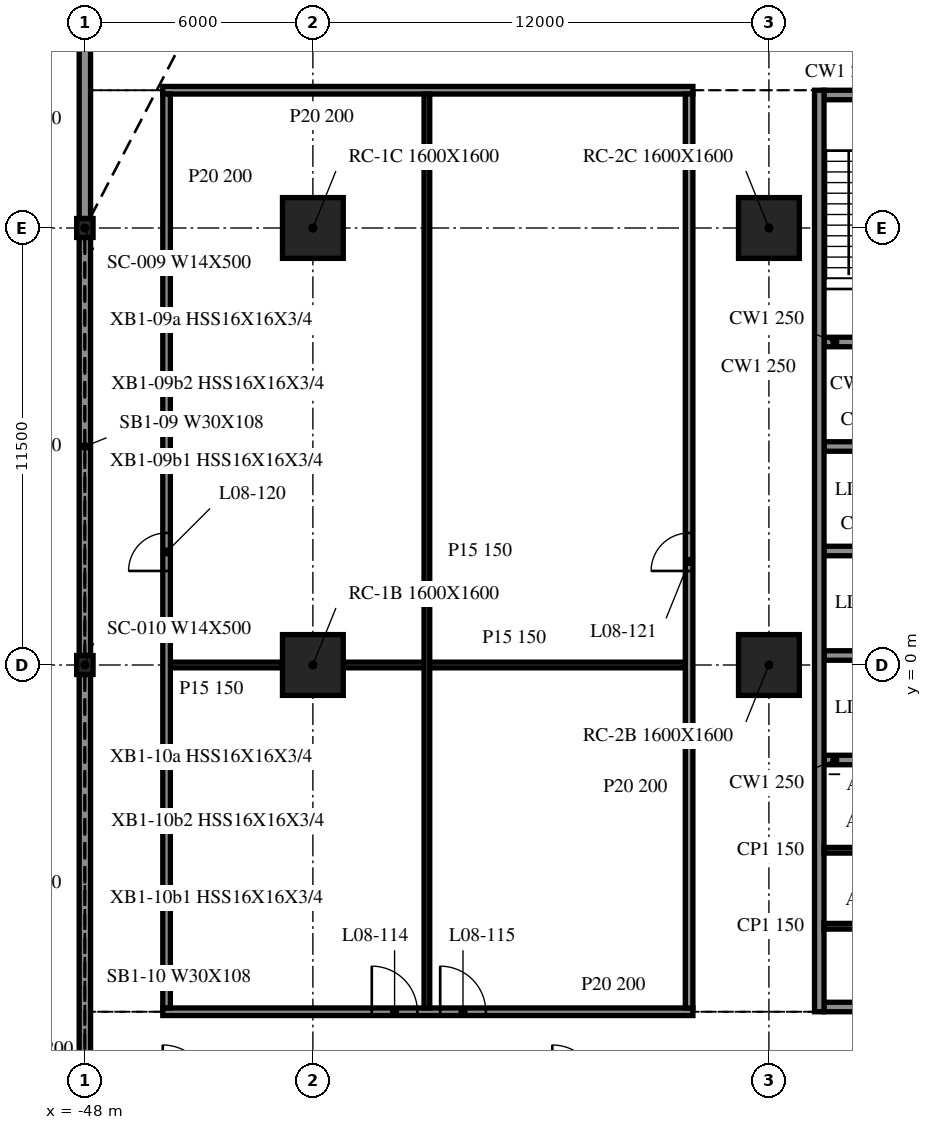
"""IFC4 building model, lengths in metres.
Left out: names, types, materials, properties, quantities, classifications, styles, units other than length and angle.
Written with IfcOpenShell. Run it as: python <this file> out.ifc"""

import sys

from ifc_helpers import new_model, si_unit, direction, frame, frame_2d, origin, origin_2d, place, context, subcontext, project, spatial, rectangle, i_section, extrude, element, fill, save


model = new_model("IFC4")
c1 = context("Model", 3, precision=1e-05, world=origin(), true_north=direction((0.0, 1.0)))
c2 = subcontext(c1, "Body", "Model", "MODEL_VIEW")
j1 = project(units=[si_unit("LENGTHUNIT", "METRE"), si_unit("PLANEANGLEUNIT", "RADIAN")], contexts=[c1])
p1 = place(None, origin())
s1 = spatial("IfcSite", under=j1, at=p1, CompositionType="ELEMENT")
p2 = place(p1, origin())
s2 = spatial("IfcBuilding", under=s1, at=p2, CompositionType="ELEMENT")
p3 = place(p2, frame((0.0, 0.0, 37.3)))
s3 = spatial("IfcBuildingStorey", under=s2, at=p3, CompositionType="ELEMENT", Elevation=37.3)
for number, where, z_axis, x_axis in (
    (1, (-42.0, 0.0, -0.34), (0.0, 0.0, 1.0), (1.0, 0.0, 0.0)),
    (2, (-42.0, 11.5, -0.34), (0.0, 0.0, 1.0), (1.0, 0.0, 0.0)),
    (3, (-30.0, 0.0, -0.34), (0.0, 0.0, 1.0), (1.0, 0.0, 0.0)),
    (4, (-30.0, 11.5, -0.34), (0.0, 0.0, 1.0), (1.0, 0.0, 0.0)),
):
    element("IfcColumn", number, at=place(p3, frame(where, z_axis=z_axis, x_axis=x_axis)), inside=s3, PredefinedType="COLUMN", context=c2, shape_type="SweptSolid", body=[
        extrude(rectangle(XDim=1.6, YDim=1.6, at=origin_2d()), origin(), (0.0, 0.0, 1.0), 4.09),
    ])
for number, where, z_axis, x_axis in (
    (5, (-48.0, 11.5, -0.34), (0.0, 0.0, 1.0), (1.0, 0.0, 0.0)),
    (6, (-48.0, 0.0, -0.34), (0.0, 0.0, 1.0), (1.0, 0.0, 0.0)),
):
    element("IfcColumn", number, at=place(p3, frame(where, z_axis=z_axis, x_axis=x_axis)), inside=s3, PredefinedType="COLUMN", context=c2, shape_type="SweptSolid", body=[
        extrude(i_section(OverallWidth=0.432, OverallDepth=0.498, WebThickness=0.056, FlangeThickness=0.089, at=origin_2d()), origin(), (0.0, 0.0, 1.0), 4.09),
    ])
p4 = place(p3, frame((-48.0, 17.0, 0.0), z_axis=(0.0, 0.0, 1.0), x_axis=(0.0, -1.0, 0.0)))
e7 = element("IfcWall", 7, at=p4, inside=s3, PredefinedType="NOTDEFINED", context=c2, shape_type="SweptSolid", body=[
    extrude(rectangle(XDim=5.251, YDim=0.3, at=frame_2d((2.625, 0.0))), origin(), (0.0, 0.0, 1.0), 3.75),
])
for number, where, z_axis, x_axis in (
    (8, (-48.0, 11.251, 0.0), (0.0, 0.0, 1.0), (0.0, -1.0, 0.0)),
    (9, (-48.0, -0.249, 0.0), (0.0, 0.0, 1.0), (0.0, -1.0, 0.0)),
):
    element("IfcWall", number, at=place(p3, frame(where, z_axis=z_axis, x_axis=x_axis)), inside=s3, PredefinedType="NOTDEFINED", context=c2, shape_type="SweptSolid", body=[
        extrude(rectangle(XDim=11.002, YDim=0.3, at=frame_2d((5.501, 0.0))), origin(), (0.0, 0.0, 1.0), 3.75),
    ])
p5 = place(p3, frame((-28.675, 15.125, 0.0), z_axis=(0.0, 0.0, 1.0), x_axis=(0.0, -1.0, 0.0)))
e10 = element("IfcWall", 10, at=p5, inside=s3, PredefinedType="SOLIDWALL", context=c2, shape_type="SweptSolid", body=[
    extrude(rectangle(XDim=24.25, YDim=0.25, at=frame_2d((12.125, 0.0))), origin(), (0.0, 0.0, 1.0), 3.75),
])
p6 = place(p3, frame((-19.45, -9.0, 0.0), z_axis=(0.0, 0.0, 1.0), x_axis=(-1.0, 0.0, 0.0)))
e11 = element("IfcWall", 11, at=p6, inside=s3, PredefinedType="SOLIDWALL", context=c2, shape_type="SweptSolid", body=[
    extrude(rectangle(XDim=9.1, YDim=0.25, at=frame_2d((4.55, 0.0))), origin(), (0.0, 0.0, 1.0), 3.75),
])
p7 = place(p6, frame((3.65, 0.0, 0.0)))
e12 = element("IfcOpeningElement", 12, at=p7, cuts=e11, PredefinedType="OPENING", context=c2, shape_type="SweptSolid", body=[
    extrude(rectangle(XDim=1.8, YDim=2.1, at=frame_2d((0.9, 1.05))), frame((0.0, 0.135, 0.0), z_axis=(0.0, -1.0, 0.0), x_axis=(1.0, 0.0, 0.0)), (0.0, 0.0, 1.0), 0.27),
])
p8 = place(p3, frame((-28.55, 15.0, 0.0), z_axis=(0.0, 0.0, 1.0), x_axis=(1.0, 0.0, 0.0)))
e13 = element("IfcWall", 13, at=p8, inside=s3, PredefinedType="SOLIDWALL", context=c2, shape_type="SweptSolid", body=[
    extrude(rectangle(XDim=9.1, YDim=0.25, at=frame_2d((4.55, 0.0))), origin(), (0.0, 0.0, 1.0), 3.75),
])
p9 = place(p8, frame((3.65, 0.0, 0.0)))
e14 = element("IfcOpeningElement", 14, at=p9, cuts=e13, PredefinedType="OPENING", context=c2, shape_type="SweptSolid", body=[
    extrude(rectangle(XDim=1.8, YDim=2.1, at=frame_2d((0.9, 1.05))), frame((0.0, 0.135, 0.0), z_axis=(0.0, -1.0, 0.0), x_axis=(1.0, 0.0, 0.0)), (0.0, 0.0, 1.0), 0.27),
])
for number, where, z_axis, x_axis in (
    (15, (-28.55, -2.5, 0.0), (0.0, 0.0, 1.0), (1.0, 0.0, 0.0)),
    (16, (-28.55, 0.25, 0.0), (0.0, 0.0, 1.0), (1.0, 0.0, 0.0)),
    (17, (-28.55, 3.0, 0.0), (0.0, 0.0, 1.0), (1.0, 0.0, 0.0)),
    (18, (-28.55, 5.75, 0.0), (0.0, 0.0, 1.0), (1.0, 0.0, 0.0)),
    (19, (-28.55, 8.5, 0.0), (0.0, 0.0, 1.0), (1.0, 0.0, 0.0)),
):
    element("IfcWall", number, at=place(p3, frame(where, z_axis=z_axis, x_axis=x_axis)), inside=s3, PredefinedType="SOLIDWALL", context=c2, shape_type="SweptSolid", body=[
        extrude(rectangle(XDim=2.85, YDim=0.25, at=frame_2d((1.425, 0.0))), origin(), (0.0, 0.0, 1.0), 3.75),
    ])
for number, where, z_axis, x_axis in (
    (20, (-28.55, -6.875, 0.0), (0.0, 0.0, 1.0), (1.0, 0.0, 0.0)),
    (21, (-28.55, -4.875, 0.0), (0.0, 0.0, 1.0), (1.0, 0.0, 0.0)),
):
    element("IfcWall", number, at=place(p3, frame(where, z_axis=z_axis, x_axis=x_axis)), inside=s3, PredefinedType="PARTITIONING", context=c2, shape_type="SweptSolid", body=[
        extrude(rectangle(XDim=2.85, YDim=0.15, at=frame_2d((1.425, 0.0))), origin(), (0.0, 0.0, 1.0), 3.75),
    ])
p10 = place(p3, frame((-45.95, -9.125, 0.0), z_axis=(0.0, 0.0, 1.0), x_axis=(1.0, 0.0, 0.0)))
e22 = element("IfcWall", 22, at=p10, inside=s3, PredefinedType="PARTITIONING", context=c2, shape_type="SweptSolid", body=[
    extrude(rectangle(XDim=13.95, YDim=0.2, at=frame_2d((6.975, 0.0))), origin(), (0.0, 0.0, 1.0), 3.75),
])
p11 = place(p10, frame((5.5, 0.0, 0.0)))
e23 = element("IfcOpeningElement", 23, at=p11, cuts=e22, PredefinedType="OPENING", context=c2, shape_type="SweptSolid", body=[
    extrude(rectangle(XDim=1.2, YDim=2.1, at=frame_2d((0.6, 1.05))), frame((0.0, 0.11, 0.0), z_axis=(0.0, -1.0, 0.0), x_axis=(1.0, 0.0, 0.0)), (0.0, 0.0, 1.0), 0.22),
])
p12 = place(p10, frame((7.3, 0.0, 0.0)))
e24 = element("IfcOpeningElement", 24, at=p12, cuts=e22, PredefinedType="OPENING", context=c2, shape_type="SweptSolid", body=[
    extrude(rectangle(XDim=1.2, YDim=2.1, at=frame_2d((0.6, 1.05))), frame((0.0, 0.11, 0.0), z_axis=(0.0, -1.0, 0.0), x_axis=(1.0, 0.0, 0.0)), (0.0, 0.0, 1.0), 0.22),
])
p13 = place(p3, frame((-45.75, 0.0, 0.0), z_axis=(0.0, 0.0, 1.0), x_axis=(1.0, 0.0, 0.0)))
e25 = element("IfcWall", 25, at=p13, inside=s3, PredefinedType="PARTITIONING", context=c2, shape_type="SweptSolid", body=[
    extrude(rectangle(XDim=2.95, YDim=0.15, at=frame_2d((1.475, 0.0))), origin(), (0.0, 0.0, 1.0), 3.75),
])
p14 = place(p3, frame((-41.2, 0.0, 0.0), z_axis=(0.0, 0.0, 1.0), x_axis=(1.0, 0.0, 0.0)))
e26 = element("IfcWall", 26, at=p14, inside=s3, PredefinedType="PARTITIONING", context=c2, shape_type="SweptSolid", body=[
    extrude(rectangle(XDim=9.0, YDim=0.15, at=frame_2d((4.5, 0.0))), origin(), (0.0, 0.0, 1.0), 3.75),
])
p15 = place(p3, frame((-45.95, 15.125, 0.0), z_axis=(0.0, 0.0, 1.0), x_axis=(1.0, 0.0, 0.0)))
e27 = element("IfcWall", 27, at=p15, inside=s3, PredefinedType="PARTITIONING", context=c2, shape_type="SweptSolid", body=[
    extrude(rectangle(XDim=13.95, YDim=0.2, at=frame_2d((6.975, 0.0))), origin(), (0.0, 0.0, 1.0), 3.75),
])
p16 = place(p3, frame((-45.85, -9.025, 0.0), z_axis=(0.0, 0.0, 1.0), x_axis=(0.0, 1.0, 0.0)))
e28 = element("IfcWall", 28, at=p16, inside=s3, PredefinedType="PARTITIONING", context=c2, shape_type="SweptSolid", body=[
    extrude(rectangle(XDim=24.05, YDim=0.2, at=frame_2d((12.025, 0.0))), origin(), (0.0, 0.0, 1.0), 3.75),
])
p17 = place(p16, frame((11.5, 0.0, 0.0)))
e29 = element("IfcOpeningElement", 29, at=p17, cuts=e28, PredefinedType="OPENING", context=c2, shape_type="SweptSolid", body=[
    extrude(rectangle(XDim=1.0, YDim=2.1, at=frame_2d((0.5, 1.05))), frame((0.0, 0.11, 0.0), z_axis=(0.0, -1.0, 0.0), x_axis=(1.0, 0.0, 0.0)), (0.0, 0.0, 1.0), 0.22),
])
p18 = place(p3, frame((-39.0, -9.025, 0.0), z_axis=(0.0, 0.0, 1.0), x_axis=(0.0, 1.0, 0.0)))
e30 = element("IfcWall", 30, at=p18, inside=s3, PredefinedType="PARTITIONING", context=c2, shape_type="SweptSolid", body=[
    extrude(rectangle(XDim=24.05, YDim=0.15, at=frame_2d((12.025, 0.0))), origin(), (0.0, 0.0, 1.0), 3.75),
])
p19 = place(p3, frame((-32.1, -9.025, 0.0), z_axis=(0.0, 0.0, 1.0), x_axis=(0.0, 1.0, 0.0)))
e31 = element("IfcWall", 31, at=p19, inside=s3, PredefinedType="PARTITIONING", context=c2, shape_type="SweptSolid", body=[
    extrude(rectangle(XDim=24.05, YDim=0.2, at=frame_2d((12.025, 0.0))), origin(), (0.0, 0.0, 1.0), 3.75),
])
p20 = place(p19, frame((11.5, 0.0, 0.0)))
e32 = element("IfcOpeningElement", 32, at=p20, cuts=e31, PredefinedType="OPENING", context=c2, shape_type="SweptSolid", body=[
    extrude(rectangle(XDim=1.0, YDim=2.1, at=frame_2d((0.5, 1.05))), frame((0.0, 0.11, 0.0), z_axis=(0.0, -1.0, 0.0), x_axis=(1.0, 0.0, 0.0)), (0.0, 0.0, 1.0), 0.22),
])
p21 = place(p11, origin())
e33 = element("IfcDoor", 33, at=p21, inside=s3, OperationType="SINGLE_SWING_LEFT", PredefinedType="DOOR", context=c2, shape_type="SweptSolid", body=[
    extrude(rectangle(XDim=1.2, YDim=2.1, at=frame_2d((0.6, 1.05))), frame((0.0, 0.025, 0.0), z_axis=(0.0, -1.0, 0.0), x_axis=(1.0, 0.0, 0.0)), (0.0, 0.0, 1.0), 0.05),
])
fill(e23, e33)
p22 = place(p12, origin())
e34 = element("IfcDoor", 34, at=p22, inside=s3, OperationType="SINGLE_SWING_RIGHT", PredefinedType="DOOR", context=c2, shape_type="SweptSolid", body=[
    extrude(rectangle(XDim=1.2, YDim=2.1, at=frame_2d((0.6, 1.05))), frame((0.0, 0.025, 0.0), z_axis=(0.0, -1.0, 0.0), x_axis=(1.0, 0.0, 0.0)), (0.0, 0.0, 1.0), 0.05),
])
fill(e24, e34)
p23 = place(p17, origin())
e35 = element("IfcDoor", 35, at=p23, inside=s3, OperationType="SINGLE_SWING_RIGHT", PredefinedType="DOOR", context=c2, shape_type="SweptSolid", body=[
    extrude(rectangle(XDim=1.0, YDim=2.1, at=frame_2d((0.5, 1.05))), frame((0.0, 0.025, 0.0), z_axis=(0.0, -1.0, 0.0), x_axis=(1.0, 0.0, 0.0)), (0.0, 0.0, 1.0), 0.05),
])
fill(e29, e35)
p24 = place(p20, origin())
e36 = element("IfcDoor", 36, at=p24, inside=s3, OperationType="SINGLE_SWING_LEFT", PredefinedType="DOOR", context=c2, shape_type="SweptSolid", body=[
    extrude(rectangle(XDim=1.0, YDim=2.1, at=frame_2d((0.5, 1.05))), frame((0.0, 0.025, 0.0), z_axis=(0.0, -1.0, 0.0), x_axis=(1.0, 0.0, 0.0)), (0.0, 0.0, 1.0), 0.05),
])
fill(e32, e36)
save(model, sys.argv[1])
